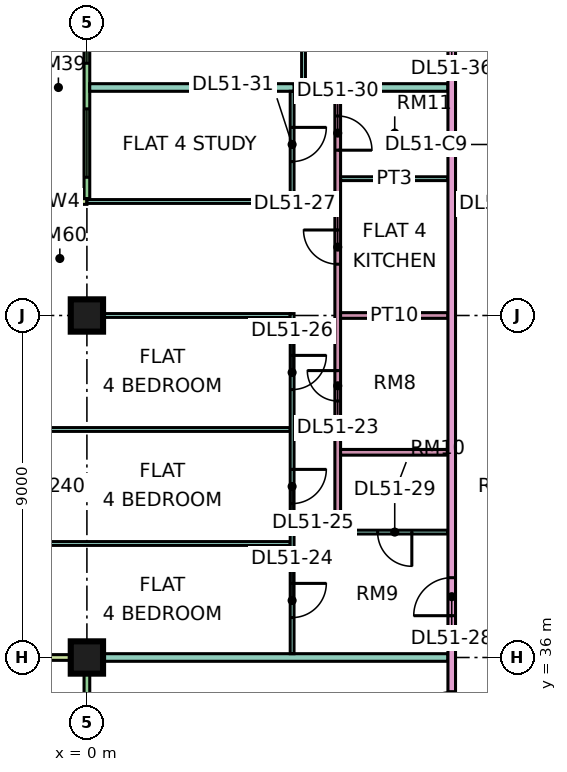
"""IFC4 building model, lengths in metres.
Left out: names, types, materials, properties, quantities, classifications, styles, units other than length and angle.
Written with IfcOpenShell. Run it as: python <this file> out.ifc"""

import sys

from ifc_helpers import new_model, si_unit, direction, frame, frame_2d, origin, origin_2d, place, context, subcontext, project, spatial, rectangle, extrude, element, fill, save


model = new_model("IFC4")
c1 = context("Model", 3, precision=1e-05, world=origin(), true_north=direction((0.0, 1.0)))
c2 = subcontext(c1, "Body", "Model", "MODEL_VIEW")
j1 = project(units=[si_unit("LENGTHUNIT", "METRE"), si_unit("PLANEANGLEUNIT", "RADIAN")], contexts=[c1])
p1 = place(None, origin())
s1 = spatial("IfcSite", under=j1, at=p1, CompositionType="ELEMENT")
p2 = place(p1, origin())
s2 = spatial("IfcBuilding", under=s1, at=p2, CompositionType="ELEMENT")
p3 = place(p2, frame((0.0, 0.0, 219.15)))
s3 = spatial("IfcBuildingStorey", under=s2, at=p3, CompositionType="ELEMENT", Elevation=219.15)
p4 = place(p3, frame((0.0, 36.0, 0.0), z_axis=(0.0, 0.0, 1.0), x_axis=(1.0, 0.0, 0.0)))
e1 = element("IfcColumn", 1, at=p4, inside=s3, PredefinedType="COLUMN", context=c2, shape_type="SweptSolid", body=[
    extrude(rectangle(XDim=0.85, YDim=0.85, at=origin_2d()), origin(), (0.0, 0.0, 1.0), 3.75),
])
p5 = place(p3, frame((0.0, 45.0, 0.0), z_axis=(0.0, 0.0, 1.0), x_axis=(1.0, 0.0, 0.0)))
e2 = element("IfcColumn", 2, at=p5, inside=s3, PredefinedType="COLUMN", context=c2, shape_type="SweptSolid", body=[
    extrude(rectangle(XDim=0.85, YDim=0.85, at=origin_2d()), origin(), (0.0, 0.0, 1.0), 3.75),
])
p6 = place(p3, frame((0.0, 61.425, 0.0), z_axis=(0.0, 0.0, 1.0), x_axis=(0.0, -1.0, 0.0)))
e3 = element("IfcWall", 3, at=p6, inside=s3, PredefinedType="SOLIDWALL", context=c2, shape_type="SweptSolid", body=[
    extrude(rectangle(XDim=13.35, YDim=0.15, at=frame_2d((6.675, 0.0))), origin(), (0.0, 0.0, 1.0), 3.35),
])
p7 = place(p6, frame((2.025, 0.0, 0.0)))
e4 = element("IfcOpeningElement", 4, at=p7, cuts=e3, PredefinedType="OPENING", context=c2, shape_type="SweptSolid", body=[
    extrude(rectangle(XDim=1.8, YDim=2.4, at=frame_2d((0.9, 1.2))), frame((0.0, 0.085, 0.0), z_axis=(0.0, -1.0, 0.0), x_axis=(1.0, 0.0, 0.0)), (0.0, 0.0, 1.0), 0.17),
])
p8 = place(p6, frame((5.062, 0.0, 0.45)))
e5 = element("IfcOpeningElement", 5, at=p8, cuts=e3, PredefinedType="OPENING", context=c2, shape_type="SweptSolid", body=[
    extrude(rectangle(XDim=1.2, YDim=2.4, at=frame_2d((0.6, 1.2))), frame((0.0, 0.085, 0.0), z_axis=(0.0, -1.0, 0.0), x_axis=(1.0, 0.0, 0.0)), (0.0, 0.0, 1.0), 0.17),
])
p9 = place(p6, frame((8.587, 0.0, 0.45)))
e6 = element("IfcOpeningElement", 6, at=p9, cuts=e3, PredefinedType="OPENING", context=c2, shape_type="SweptSolid", body=[
    extrude(rectangle(XDim=1.2, YDim=2.4, at=frame_2d((0.6, 1.2))), frame((0.0, 0.085, 0.0), z_axis=(0.0, -1.0, 0.0), x_axis=(1.0, 0.0, 0.0)), (0.0, 0.0, 1.0), 0.17),
])
p10 = place(p6, frame((10.988, 0.0, 0.45)))
e7 = element("IfcOpeningElement", 7, at=p10, cuts=e3, PredefinedType="OPENING", context=c2, shape_type="SweptSolid", body=[
    extrude(rectangle(XDim=1.8, YDim=2.4, at=frame_2d((0.9, 1.2))), frame((0.0, 0.085, 0.0), z_axis=(0.0, -1.0, 0.0), x_axis=(1.0, 0.0, 0.0)), (0.0, 0.0, 1.0), 0.17),
])
p11 = place(p3, frame((-1.5, 48.0, 0.0), z_axis=(0.0, 0.0, 1.0), x_axis=(1.0, 0.0, 0.0)))
e8 = element("IfcWall", 8, at=p11, inside=s3, PredefinedType="SOLIDWALL", context=c2, shape_type="SweptSolid", body=[
    extrude(rectangle(XDim=1.5, YDim=0.15, at=frame_2d((0.75, 0.0))), origin(), (0.0, 0.0, 1.0), 3.35),
])
p12 = place(p3, frame((0.0, 35.925, 0.0), z_axis=(0.0, 0.0, 1.0), x_axis=(0.0, -1.0, 0.0)))
e9 = element("IfcWall", 9, at=p12, inside=s3, PredefinedType="SOLIDWALL", context=c2, shape_type="SweptSolid", body=[
    extrude(rectangle(XDim=11.85, YDim=0.15, at=frame_2d((5.925, 0.0))), origin(), (0.0, 0.0, 1.0), 3.35),
])
p13 = place(p12, frame((2.288, 0.0, 0.0)))
e10 = element("IfcOpeningElement", 10, at=p13, cuts=e9, PredefinedType="OPENING", context=c2, shape_type="SweptSolid", body=[
    extrude(rectangle(XDim=1.8, YDim=2.4, at=frame_2d((0.9, 1.2))), frame((0.0, 0.085, 0.0), z_axis=(0.0, -1.0, 0.0), x_axis=(1.0, 0.0, 0.0)), (0.0, 0.0, 1.0), 0.17),
])
p14 = place(p12, frame((6.525, 0.0, 0.45)))
e11 = element("IfcOpeningElement", 11, at=p14, cuts=e9, PredefinedType="OPENING", context=c2, shape_type="SweptSolid", body=[
    extrude(rectangle(XDim=1.8, YDim=2.4, at=frame_2d((0.9, 1.2))), frame((0.0, 0.085, 0.0), z_axis=(0.0, -1.0, 0.0), x_axis=(1.0, 0.0, 0.0)), (0.0, 0.0, 1.0), 0.17),
])
p15 = place(p12, frame((9.562, 0.0, 0.45)))
e12 = element("IfcOpeningElement", 12, at=p15, cuts=e9, PredefinedType="OPENING", context=c2, shape_type="SweptSolid", body=[
    extrude(rectangle(XDim=1.2, YDim=2.4, at=frame_2d((0.6, 1.2))), frame((0.0, 0.085, 0.0), z_axis=(0.0, -1.0, 0.0), x_axis=(1.0, 0.0, 0.0)), (0.0, 0.0, 1.0), 0.17),
])
p16 = place(p3, frame((-1.5, 36.0, 0.0), z_axis=(0.0, 0.0, 1.0), x_axis=(1.0, 0.0, 0.0)))
e13 = element("IfcWall", 13, at=p16, inside=s3, PredefinedType="SOLIDWALL", context=c2, shape_type="SweptSolid", body=[
    extrude(rectangle(XDim=1.5, YDim=0.15, at=frame_2d((0.75, 0.0))), origin(), (0.0, 0.0, 1.0), 3.35),
])
for number, where, z_axis, x_axis in (
    (14, (-1.351, 39.0, 0.0), (0.0, 0.0, 1.0), (1.0, 0.0, 0.0)),
    (15, (-1.351, 42.0, 0.0), (0.0, 0.0, 1.0), (1.0, 0.0, 0.0)),
):
    element("IfcWall", number, at=place(p3, frame(where, z_axis=z_axis, x_axis=x_axis)), inside=s3, PredefinedType="PARTITIONING", context=c2, shape_type="SweptSolid", body=[
        extrude(rectangle(XDim=6.701, YDim=0.1, at=frame_2d((3.351, 0.0))), origin(), (0.0, 0.0, 1.0), 3.35),
    ])
e16 = element("IfcWall", 16, at=p4, inside=s3, PredefinedType="PARTITIONING", context=c2, shape_type="SweptSolid", body=[
    extrude(rectangle(XDim=9.5, YDim=0.2, at=frame_2d((4.75, 0.0))), origin(), (0.0, 0.0, 1.0), 3.35),
])
e17 = element("IfcWall", 17, at=p5, inside=s3, PredefinedType="PARTITIONING", context=c2, shape_type="SweptSolid", body=[
    extrude(rectangle(XDim=5.35, YDim=0.1, at=frame_2d((2.675, 0.0))), origin(), (0.0, 0.0, 1.0), 3.35),
])
p17 = place(p3, frame((0.0, 48.0, 0.0), z_axis=(0.0, 0.0, 1.0), x_axis=(1.0, 0.0, 0.0)))
e18 = element("IfcWall", 18, at=p17, inside=s3, PredefinedType="PARTITIONING", context=c2, shape_type="SweptSolid", body=[
    extrude(rectangle(XDim=5.45, YDim=0.1, at=frame_2d((2.725, 0.0))), origin(), (0.0, 0.0, 1.0), 3.35),
])
p18 = place(p3, frame((0.074, 51.0, 0.0), z_axis=(0.0, 0.0, 1.0), x_axis=(1.0, 0.0, 0.0)))
e19 = element("IfcWall", 19, at=p18, inside=s3, PredefinedType="PARTITIONING", context=c2, shape_type="SweptSolid", body=[
    extrude(rectangle(XDim=5.376, YDim=0.2, at=frame_2d((2.688, 0.0))), origin(), (0.0, 0.0, 1.0), 3.35),
])
p19 = place(p3, frame((5.4, 36.1, 0.0), z_axis=(0.0, 0.0, 1.0), x_axis=(0.0, 1.0, 0.0)))
e20 = element("IfcWall", 20, at=p19, inside=s3, PredefinedType="PARTITIONING", context=c2, shape_type="SweptSolid", body=[
    extrude(rectangle(XDim=8.95, YDim=0.1, at=frame_2d((4.475, 0.0))), origin(), (0.0, 0.0, 1.0), 3.35),
])
p20 = place(p19, frame((0.95, 0.0, 0.0)))
e21 = element("IfcOpeningElement", 21, at=p20, cuts=e20, PredefinedType="OPENING", context=c2, shape_type="SweptSolid", body=[
    extrude(rectangle(XDim=0.9, YDim=2.1, at=frame_2d((0.45, 1.05))), frame((0.0, 0.06, 0.0), z_axis=(0.0, -1.0, 0.0), x_axis=(1.0, 0.0, 0.0)), (0.0, 0.0, 1.0), 0.12),
])
p21 = place(p19, frame((3.95, 0.0, 0.0)))
e22 = element("IfcOpeningElement", 22, at=p21, cuts=e20, PredefinedType="OPENING", context=c2, shape_type="SweptSolid", body=[
    extrude(rectangle(XDim=0.9, YDim=2.1, at=frame_2d((0.45, 1.05))), frame((0.0, 0.06, 0.0), z_axis=(0.0, -1.0, 0.0), x_axis=(1.0, 0.0, 0.0)), (0.0, 0.0, 1.0), 0.12),
])
p22 = place(p19, frame((6.95, 0.0, 0.0)))
e23 = element("IfcOpeningElement", 23, at=p22, cuts=e20, PredefinedType="OPENING", context=c2, shape_type="SweptSolid", body=[
    extrude(rectangle(XDim=0.9, YDim=2.1, at=frame_2d((0.45, 1.05))), frame((0.0, 0.06, 0.0), z_axis=(0.0, -1.0, 0.0), x_axis=(1.0, 0.0, 0.0)), (0.0, 0.0, 1.0), 0.12),
])
p23 = place(p3, frame((5.4, 48.05, 0.0), z_axis=(0.0, 0.0, 1.0), x_axis=(0.0, 1.0, 0.0)))
e24 = element("IfcWall", 24, at=p23, inside=s3, PredefinedType="PARTITIONING", context=c2, shape_type="SweptSolid", body=[
    extrude(rectangle(XDim=2.85, YDim=0.1, at=frame_2d((1.425, 0.0))), origin(), (0.0, 0.0, 1.0), 3.35),
])
p24 = place(p23, frame((1.0, 0.0, 0.0)))
e25 = element("IfcOpeningElement", 25, at=p24, cuts=e24, PredefinedType="OPENING", context=c2, shape_type="SweptSolid", body=[
    extrude(rectangle(XDim=0.9, YDim=2.1, at=frame_2d((0.45, 1.05))), frame((0.0, 0.06, 0.0), z_axis=(0.0, -1.0, 0.0), x_axis=(1.0, 0.0, 0.0)), (0.0, 0.0, 1.0), 0.12),
])
p25 = place(p3, frame((5.65, 51.0, 0.0), z_axis=(0.0, 0.0, 1.0), x_axis=(1.0, 0.0, 0.0)))
e26 = element("IfcWall", 26, at=p25, inside=s3, PredefinedType="PARTITIONING", context=c2, shape_type="SweptSolid", body=[
    extrude(rectangle(XDim=3.85, YDim=0.2, at=frame_2d((1.925, 0.0))), origin(), (0.0, 0.0, 1.0), 3.35),
])
p26 = place(p3, frame((5.7, 51.1, 0.0), z_axis=(0.0, 0.0, 1.0), x_axis=(0.0, 1.0, 0.0)))
e27 = element("IfcWall", 27, at=p26, inside=s3, PredefinedType="PARTITIONING", context=c2, shape_type="SweptSolid", body=[
    extrude(rectangle(XDim=8.95, YDim=0.1, at=frame_2d((4.475, 0.0))), origin(), (0.0, 0.0, 1.0), 3.35),
])
p27 = place(p26, frame((0.95, 0.0, 0.0)))
e28 = element("IfcOpeningElement", 28, at=p27, cuts=e27, PredefinedType="OPENING", context=c2, shape_type="SweptSolid", body=[
    extrude(rectangle(XDim=0.9, YDim=2.1, at=frame_2d((0.45, 1.05))), frame((0.0, 0.06, 0.0), z_axis=(0.0, -1.0, 0.0), x_axis=(1.0, 0.0, 0.0)), (0.0, 0.0, 1.0), 0.12),
])
p28 = place(p26, frame((3.95, 0.0, 0.0)))
e29 = element("IfcOpeningElement", 29, at=p28, cuts=e27, PredefinedType="OPENING", context=c2, shape_type="SweptSolid", body=[
    extrude(rectangle(XDim=0.9, YDim=2.1, at=frame_2d((0.45, 1.05))), frame((0.0, 0.06, 0.0), z_axis=(0.0, -1.0, 0.0), x_axis=(1.0, 0.0, 0.0)), (0.0, 0.0, 1.0), 0.12),
])
p29 = place(p26, frame((6.95, 0.0, 0.0)))
e30 = element("IfcOpeningElement", 30, at=p29, cuts=e27, PredefinedType="OPENING", context=c2, shape_type="SweptSolid", body=[
    extrude(rectangle(XDim=0.9, YDim=2.1, at=frame_2d((0.45, 1.05))), frame((0.0, 0.06, 0.0), z_axis=(0.0, -1.0, 0.0), x_axis=(1.0, 0.0, 0.0)), (0.0, 0.0, 1.0), 0.12),
])
p30 = place(p3, frame((6.6, 39.25, 0.0), z_axis=(0.0, 0.0, 1.0), x_axis=(0.0, 1.0, 0.0)))
e31 = element("IfcWall", 31, at=p30, inside=s3, PredefinedType="PARTITIONING", context=c2, shape_type="SweptSolid", body=[
    extrude(rectangle(XDim=11.65, YDim=0.15, at=frame_2d((5.825, 0.0))), origin(), (0.0, 0.0, 1.0), 3.35),
])
p31 = place(p30, frame((3.5, 0.0, 0.0)))
e32 = element("IfcOpeningElement", 32, at=p31, cuts=e31, PredefinedType="OPENING", context=c2, shape_type="SweptSolid", body=[
    extrude(rectangle(XDim=0.8, YDim=2.1, at=frame_2d((0.4, 1.05))), frame((0.0, 0.085, 0.0), z_axis=(0.0, -1.0, 0.0), x_axis=(1.0, 0.0, 0.0)), (0.0, 0.0, 1.0), 0.17),
])
p32 = place(p30, frame((7.1, 0.0, 0.0)))
e33 = element("IfcOpeningElement", 33, at=p32, cuts=e31, PredefinedType="OPENING", context=c2, shape_type="SweptSolid", body=[
    extrude(rectangle(XDim=0.9, YDim=2.1, at=frame_2d((0.45, 1.05))), frame((0.0, 0.085, 0.0), z_axis=(0.0, -1.0, 0.0), x_axis=(1.0, 0.0, 0.0)), (0.0, 0.0, 1.0), 0.17),
])
p33 = place(p30, frame((10.1, 0.0, 0.0)))
e34 = element("IfcOpeningElement", 34, at=p33, cuts=e31, PredefinedType="OPENING", context=c2, shape_type="SweptSolid", body=[
    extrude(rectangle(XDim=0.9, YDim=2.1, at=frame_2d((0.45, 1.05))), frame((0.0, 0.085, 0.0), z_axis=(0.0, -1.0, 0.0), x_axis=(1.0, 0.0, 0.0)), (0.0, 0.0, 1.0), 0.17),
])
p34 = place(p3, frame((6.675, 39.3, 0.0), z_axis=(0.0, 0.0, 1.0), x_axis=(1.0, 0.0, 0.0)))
e35 = element("IfcWall", 35, at=p34, inside=s3, PredefinedType="PARTITIONING", context=c2, shape_type="SweptSolid", body=[
    extrude(rectangle(XDim=2.825, YDim=0.1, at=frame_2d((1.413, 0.0))), origin(), (0.0, 0.0, 1.0), 3.35),
])
p35 = place(p34, frame((0.975, 0.0, 0.0)))
e36 = element("IfcOpeningElement", 36, at=p35, cuts=e35, PredefinedType="OPENING", context=c2, shape_type="SweptSolid", body=[
    extrude(rectangle(XDim=0.9, YDim=2.1, at=frame_2d((0.45, 1.05))), frame((0.0, 0.06, 0.0), z_axis=(0.0, -1.0, 0.0), x_axis=(1.0, 0.0, 0.0)), (0.0, 0.0, 1.0), 0.12),
])
for number, where, z_axis, x_axis in (
    (37, (6.675, 41.4, 0.0), (0.0, 0.0, 1.0), (1.0, 0.0, 0.0)),
    (38, (6.675, 45.0, 0.0), (0.0, 0.0, 1.0), (1.0, 0.0, 0.0)),
):
    element("IfcWall", number, at=place(p3, frame(where, z_axis=z_axis, x_axis=x_axis)), inside=s3, PredefinedType="PARTITIONING", context=c2, shape_type="SweptSolid", body=[
        extrude(rectangle(XDim=2.825, YDim=0.15, at=frame_2d((1.413, 0.0))), origin(), (0.0, 0.0, 1.0), 3.35),
    ])
p36 = place(p3, frame((6.675, 48.6, 0.0), z_axis=(0.0, 0.0, 1.0), x_axis=(1.0, 0.0, 0.0)))
e39 = element("IfcWall", 39, at=p36, inside=s3, PredefinedType="PARTITIONING", context=c2, shape_type="SweptSolid", body=[
    extrude(rectangle(XDim=2.825, YDim=0.1, at=frame_2d((1.413, 0.0))), origin(), (0.0, 0.0, 1.0), 3.35),
])
p37 = place(p3, frame((9.6, 20.0, 0.0), z_axis=(0.0, 0.0, 1.0), x_axis=(0.0, 1.0, 0.0)))
e40 = element("IfcWall", 40, at=p37, inside=s3, PredefinedType="PARTITIONING", context=c2, shape_type="SweptSolid", body=[
    extrude(rectangle(XDim=42.926, YDim=0.2, at=frame_2d((21.463, 0.0))), origin(), (0.0, 0.0, 1.0), 3.35),
])
p38 = place(p37, frame((17.1, 0.0, 0.0)))
e41 = element("IfcOpeningElement", 41, at=p38, cuts=e40, PredefinedType="OPENING", context=c2, shape_type="SweptSolid", body=[
    extrude(rectangle(XDim=1.0, YDim=2.1, at=frame_2d((0.5, 1.05))), frame((0.0, 0.11, 0.0), z_axis=(0.0, -1.0, 0.0), x_axis=(1.0, 0.0, 0.0)), (0.0, 0.0, 1.0), 0.22),
])
p39 = place(p37, frame((32.1, 0.0, 0.0)))
e42 = element("IfcOpeningElement", 42, at=p39, cuts=e40, PredefinedType="OPENING", context=c2, shape_type="SweptSolid", body=[
    extrude(rectangle(XDim=1.0, YDim=2.1, at=frame_2d((0.5, 1.05))), frame((0.0, 0.11, 0.0), z_axis=(0.0, -1.0, 0.0), x_axis=(1.0, 0.0, 0.0)), (0.0, 0.0, 1.0), 0.22),
])
p40 = place(p37, frame((0.6, 0.0, 0.0)))
e43 = element("IfcOpeningElement", 43, at=p40, cuts=e40, PredefinedType="OPENING", context=c2, shape_type="SweptSolid", body=[
    extrude(rectangle(XDim=1.2, YDim=2.1, at=frame_2d((0.6, 1.05))), frame((0.0, 0.11, 0.0), z_axis=(0.0, -1.0, 0.0), x_axis=(1.0, 0.0, 0.0)), (0.0, 0.0, 1.0), 0.22),
])
p41 = place(p37, frame((14.1, 0.0, 0.0)))
e44 = element("IfcOpeningElement", 44, at=p41, cuts=e40, PredefinedType="OPENING", context=c2, shape_type="SweptSolid", body=[
    extrude(rectangle(XDim=1.0, YDim=2.1, at=frame_2d((0.5, 1.05))), frame((0.0, 0.11, 0.0), z_axis=(0.0, -1.0, 0.0), x_axis=(1.0, 0.0, 0.0)), (0.0, 0.0, 1.0), 0.22),
])
p42 = place(p9, origin())
e45 = element("IfcWindow", 45, at=p42, inside=s3, PartitioningType="SINGLE_PANEL", PredefinedType="WINDOW", context=c2, shape_type="SweptSolid", body=[
    extrude(rectangle(XDim=1.2, YDim=2.4, at=frame_2d((0.6, 1.2))), frame((0.0, 0.03, 0.0), z_axis=(0.0, -1.0, 0.0), x_axis=(1.0, 0.0, 0.0)), (0.0, 0.0, 1.0), 0.06),
])
fill(e6, e45)
p43 = place(p10, origin())
e46 = element("IfcWindow", 46, at=p43, inside=s3, PartitioningType="SINGLE_PANEL", PredefinedType="WINDOW", context=c2, shape_type="SweptSolid", body=[
    extrude(rectangle(XDim=1.8, YDim=2.4, at=frame_2d((0.9, 1.2))), frame((0.0, 0.03, 0.0), z_axis=(0.0, -1.0, 0.0), x_axis=(1.0, 0.0, 0.0)), (0.0, 0.0, 1.0), 0.06),
])
fill(e7, e46)
p44 = place(p31, frame((0.8, 0.0, 0.0), z_axis=(0.0, 0.0, 1.0), x_axis=(-1.0, 0.0, 0.0)))
e47 = element("IfcDoor", 47, at=p44, inside=s3, OperationType="SINGLE_SWING_RIGHT", PredefinedType="DOOR", context=c2, shape_type="SweptSolid", body=[
    extrude(rectangle(XDim=0.8, YDim=2.1, at=frame_2d((0.4, 1.05))), frame((0.0, 0.025, 0.0), z_axis=(0.0, -1.0, 0.0), x_axis=(1.0, 0.0, 0.0)), (0.0, 0.0, 1.0), 0.05),
])
fill(e32, e47)
p45 = place(p20, origin())
e48 = element("IfcDoor", 48, at=p45, inside=s3, OperationType="SINGLE_SWING_RIGHT", PredefinedType="DOOR", context=c2, shape_type="SweptSolid", body=[
    extrude(rectangle(XDim=0.9, YDim=2.1, at=frame_2d((0.45, 1.05))), frame((0.0, 0.025, 0.0), z_axis=(0.0, -1.0, 0.0), x_axis=(1.0, 0.0, 0.0)), (0.0, 0.0, 1.0), 0.05),
])
fill(e21, e48)
p46 = place(p21, origin())
e49 = element("IfcDoor", 49, at=p46, inside=s3, OperationType="SINGLE_SWING_RIGHT", PredefinedType="DOOR", context=c2, shape_type="SweptSolid", body=[
    extrude(rectangle(XDim=0.9, YDim=2.1, at=frame_2d((0.45, 1.05))), frame((0.0, 0.025, 0.0), z_axis=(0.0, -1.0, 0.0), x_axis=(1.0, 0.0, 0.0)), (0.0, 0.0, 1.0), 0.05),
])
fill(e22, e49)
p47 = place(p22, origin())
e50 = element("IfcDoor", 50, at=p47, inside=s3, OperationType="SINGLE_SWING_RIGHT", PredefinedType="DOOR", context=c2, shape_type="SweptSolid", body=[
    extrude(rectangle(XDim=0.9, YDim=2.1, at=frame_2d((0.45, 1.05))), frame((0.0, 0.025, 0.0), z_axis=(0.0, -1.0, 0.0), x_axis=(1.0, 0.0, 0.0)), (0.0, 0.0, 1.0), 0.05),
])
fill(e23, e50)
p48 = place(p32, frame((0.9, 0.0, 0.0), z_axis=(0.0, 0.0, 1.0), x_axis=(-1.0, 0.0, 0.0)))
e51 = element("IfcDoor", 51, at=p48, inside=s3, OperationType="SINGLE_SWING_RIGHT", PredefinedType="DOOR", context=c2, shape_type="SweptSolid", body=[
    extrude(rectangle(XDim=0.9, YDim=2.1, at=frame_2d((0.45, 1.05))), frame((0.0, 0.025, 0.0), z_axis=(0.0, -1.0, 0.0), x_axis=(1.0, 0.0, 0.0)), (0.0, 0.0, 1.0), 0.05),
])
fill(e33, e51)
p49 = place(p38, origin())
e52 = element("IfcDoor", 52, at=p49, inside=s3, OperationType="SINGLE_SWING_LEFT", PredefinedType="DOOR", context=c2, shape_type="SweptSolid", body=[
    extrude(rectangle(XDim=1.0, YDim=2.1, at=frame_2d((0.5, 1.05))), frame((0.0, 0.025, 0.0), z_axis=(0.0, -1.0, 0.0), x_axis=(1.0, 0.0, 0.0)), (0.0, 0.0, 1.0), 0.05),
])
fill(e41, e52)
p50 = place(p35, origin())
e53 = element("IfcDoor", 53, at=p50, inside=s3, OperationType="SINGLE_SWING_RIGHT", PredefinedType="DOOR", context=c2, shape_type="SweptSolid", body=[
    extrude(rectangle(XDim=0.9, YDim=2.1, at=frame_2d((0.45, 1.05))), frame((0.0, 0.025, 0.0), z_axis=(0.0, -1.0, 0.0), x_axis=(1.0, 0.0, 0.0)), (0.0, 0.0, 1.0), 0.05),
])
fill(e36, e53)
p51 = place(p33, frame((0.9, 0.0, 0.0), z_axis=(0.0, 0.0, 1.0), x_axis=(-1.0, 0.0, 0.0)))
e54 = element("IfcDoor", 54, at=p51, inside=s3, OperationType="SINGLE_SWING_LEFT", PredefinedType="DOOR", context=c2, shape_type="SweptSolid", body=[
    extrude(rectangle(XDim=0.9, YDim=2.1, at=frame_2d((0.45, 1.05))), frame((0.0, 0.025, 0.0), z_axis=(0.0, -1.0, 0.0), x_axis=(1.0, 0.0, 0.0)), (0.0, 0.0, 1.0), 0.05),
])
fill(e34, e54)
p52 = place(p24, origin())
e55 = element("IfcDoor", 55, at=p52, inside=s3, OperationType="SINGLE_SWING_RIGHT", PredefinedType="DOOR", context=c2, shape_type="SweptSolid", body=[
    extrude(rectangle(XDim=0.9, YDim=2.1, at=frame_2d((0.45, 1.05))), frame((0.0, 0.025, 0.0), z_axis=(0.0, -1.0, 0.0), x_axis=(1.0, 0.0, 0.0)), (0.0, 0.0, 1.0), 0.05),
])
fill(e25, e55)
p53 = place(p41, origin())
e56 = element("IfcDoor", 56, at=p53, inside=s3, OperationType="SINGLE_SWING_LEFT", PredefinedType="DOOR", context=c2, shape_type="SweptSolid", body=[
    extrude(rectangle(XDim=1.0, YDim=2.1, at=frame_2d((0.5, 1.05))), frame((0.0, 0.025, 0.0), z_axis=(0.0, -1.0, 0.0), x_axis=(1.0, 0.0, 0.0)), (0.0, 0.0, 1.0), 0.05),
])
fill(e44, e56)
save(model, sys.argv[1])
